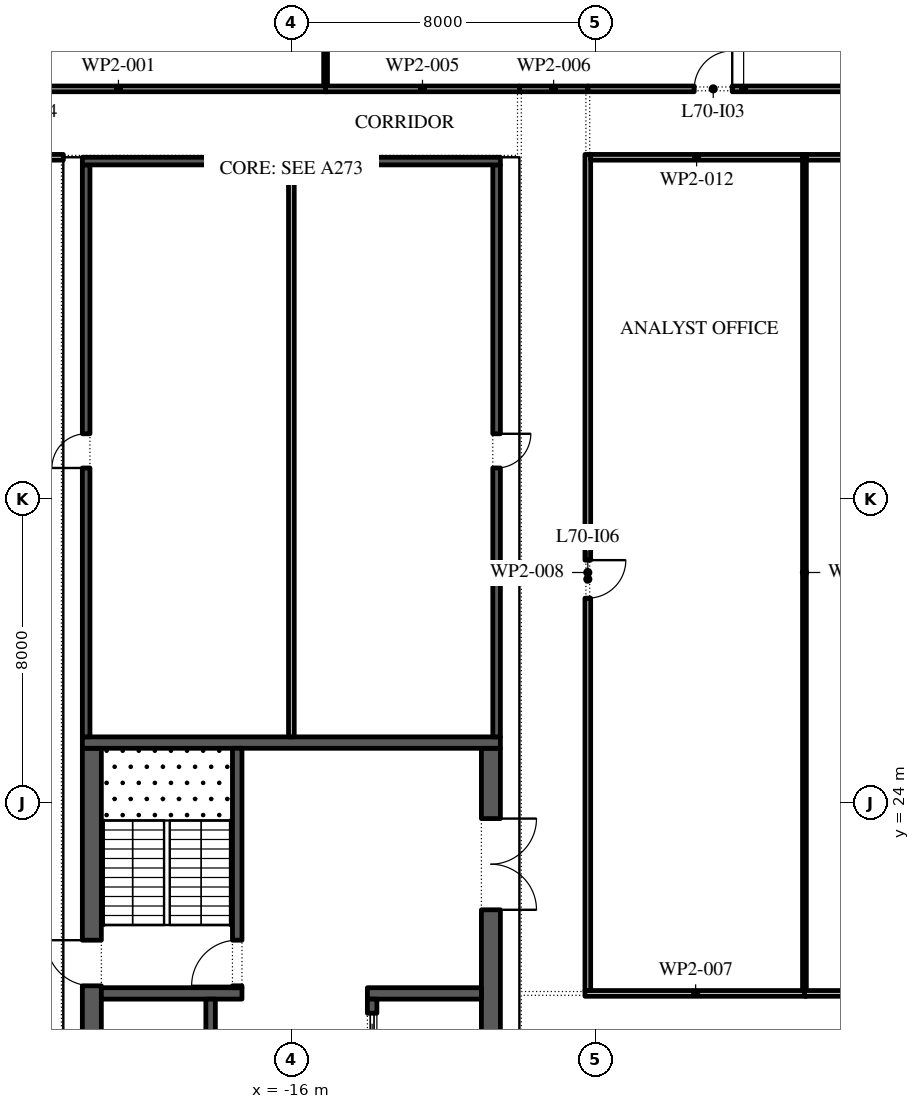
"""IFC4 building model, lengths in metres.
Left out: names, types, materials, properties, quantities, classifications, styles, units other than length and angle.
Written with IfcOpenShell. Run it as: python <this file> out.ifc"""

import sys

from ifc_helpers import new_model, si_unit, direction, frame, frame_2d, origin, place, context, subcontext, project, spatial, rectangle, extrude, element, fill, save


model = new_model("IFC4")
c1 = context("Model", 3, precision=1e-05, world=origin(), true_north=direction((0.0, 1.0)))
c2 = subcontext(c1, "Body", "Model", "MODEL_VIEW")
j1 = project(units=[si_unit("LENGTHUNIT", "METRE"), si_unit("PLANEANGLEUNIT", "RADIAN")], contexts=[c1])
p1 = place(None, origin())
s1 = spatial("IfcSite", under=j1, at=p1, CompositionType="ELEMENT")
p2 = place(p1, origin())
s2 = spatial("IfcBuilding", under=s1, at=p2, CompositionType="ELEMENT")
p3 = place(p2, frame((0.0, 0.0, 321.6)))
s3 = spatial("IfcBuildingStorey", under=s2, at=p3, CompositionType="ELEMENT", Elevation=321.6)
p4 = place(p3, frame((-21.25, -2.45, 0.0), z_axis=(0.0, 0.0, 1.0), x_axis=(0.0, 1.0, 0.0)))
e1 = element("IfcWall", 1, at=p4, inside=s3, PredefinedType="SHEAR", context=c2, shape_type="SweptSolid", body=[
    extrude(rectangle(XDim=27.9, YDim=0.5, at=frame_2d((13.95, 0.0))), origin(), (0.0, 0.0, 1.0), 4.0),
])
p5 = place(p4, frame((5.05, 0.0, 0.0)))
e2 = element("IfcOpeningElement", 2, at=p5, cuts=e1, PredefinedType="OPENING", context=c2, shape_type="SweptSolid", body=[
    extrude(rectangle(XDim=1.2, YDim=2.1, at=frame_2d((0.6, 1.05))), frame((0.0, 0.26, 0.0), z_axis=(0.0, -1.0, 0.0), x_axis=(1.0, 0.0, 0.0)), (0.0, 0.0, 1.0), 0.52),
])
p6 = place(p4, frame((21.65, 0.0, 0.0)))
e3 = element("IfcOpeningElement", 3, at=p6, cuts=e1, PredefinedType="OPENING", context=c2, shape_type="SweptSolid", body=[
    extrude(rectangle(XDim=1.2, YDim=2.1, at=frame_2d((0.6, 1.05))), frame((0.0, 0.26, 0.0), z_axis=(0.0, -1.0, 0.0), x_axis=(1.0, 0.0, 0.0)), (0.0, 0.0, 1.0), 0.52),
])
p7 = place(p3, frame((-10.75, -2.45, 0.0), z_axis=(0.0, 0.0, 1.0), x_axis=(0.0, 1.0, 0.0)))
e4 = element("IfcWall", 4, at=p7, inside=s3, PredefinedType="SHEAR", context=c2, shape_type="SweptSolid", body=[
    extrude(rectangle(XDim=27.9, YDim=0.5, at=frame_2d((13.95, 0.0))), origin(), (0.0, 0.0, 1.0), 4.0),
])
p8 = place(p7, frame((23.65, 0.0, 0.0)))
e5 = element("IfcOpeningElement", 5, at=p8, cuts=e4, PredefinedType="OPENING", context=c2, shape_type="SweptSolid", body=[
    extrude(rectangle(XDim=2.4, YDim=2.1, at=frame_2d((1.2, 1.05))), frame((0.0, 0.26, 0.0), z_axis=(0.0, -1.0, 0.0), x_axis=(1.0, 0.0, 0.0)), (0.0, 0.0, 1.0), 0.52),
])
p9 = place(p7, frame((1.387, 0.0, 0.0)))
e6 = element("IfcOpeningElement", 6, at=p9, cuts=e4, PredefinedType="OPENING", context=c2, shape_type="SweptSolid", body=[
    extrude(rectangle(XDim=0.9, YDim=2.1, at=frame_2d((0.45, 1.05))), frame((0.0, 0.26, 0.0), z_axis=(0.0, -1.0, 0.0), x_axis=(1.0, 0.0, 0.0)), (0.0, 0.0, 1.0), 0.52),
])
p10 = place(p7, frame((4.562, 0.0, 0.0)))
e7 = element("IfcOpeningElement", 7, at=p10, cuts=e4, PredefinedType="OPENING", context=c2, shape_type="SweptSolid", body=[
    extrude(rectangle(XDim=1.0, YDim=2.1, at=frame_2d((0.5, 1.05))), frame((0.0, 0.26, 0.0), z_axis=(0.0, -1.0, 0.0), x_axis=(1.0, 0.0, 0.0)), (0.0, 0.0, 1.0), 0.52),
])
p11 = place(p3, frame((-21.5, 25.6, 0.0), z_axis=(0.0, 0.0, 1.0), x_axis=(1.0, 0.0, 0.0)))
e8 = element("IfcWall", 8, at=p11, inside=s3, PredefinedType="SHEAR", context=c2, shape_type="SweptSolid", body=[
    extrude(rectangle(XDim=11.0, YDim=0.3, at=frame_2d((5.5, 0.0))), origin(), (0.0, 0.0, 1.0), 4.0),
])
p12 = place(p3, frame((-21.0, 19.0, 0.0), z_axis=(0.0, 0.0, 1.0), x_axis=(1.0, 0.0, 0.0)))
e9 = element("IfcWall", 9, at=p12, inside=s3, PredefinedType="SHEAR", context=c2, shape_type="SweptSolid", body=[
    extrude(rectangle(XDim=3.7, YDim=0.3, at=frame_2d((1.85, 0.0))), origin(), (0.0, 0.0, 1.0), 4.0),
])
p13 = place(p3, frame((-17.425, 19.15, 0.0), z_axis=(0.0, 0.0, 1.0), x_axis=(0.0, 1.0, 0.0)))
e10 = element("IfcWall", 10, at=p13, inside=s3, PredefinedType="SHEAR", context=c2, shape_type="SweptSolid", body=[
    extrude(rectangle(XDim=6.3, YDim=0.25, at=frame_2d((3.15, 0.0))), origin(), (0.0, 0.0, 1.0), 4.0),
])
p14 = place(p13, frame((0.05, 0.0, 0.0)))
e11 = element("IfcOpeningElement", 11, at=p14, cuts=e10, PredefinedType="OPENING", context=c2, shape_type="SweptSolid", body=[
    extrude(rectangle(XDim=1.2, YDim=2.1, at=frame_2d((0.6, 1.05))), frame((0.0, 0.135, 0.0), z_axis=(0.0, -1.0, 0.0), x_axis=(1.0, 0.0, 0.0)), (0.0, 0.0, 1.0), 0.27),
])
p15 = place(p3, frame((-18.125, 4.15, 0.0), z_axis=(0.0, 0.0, 1.0), x_axis=(0.0, 1.0, 0.0)))
e12 = element("IfcWall", 12, at=p15, inside=s3, PredefinedType="SHEAR", context=c2, shape_type="SweptSolid", body=[
    extrude(rectangle(XDim=14.7, YDim=0.25, at=frame_2d((7.35, 0.0))), origin(), (0.0, 0.0, 1.0), 4.0),
])
p16 = place(p15, frame((3.796, 0.0, 0.0)))
e13 = element("IfcOpeningElement", 13, at=p16, cuts=e12, PredefinedType="OPENING", context=c2, shape_type="SweptSolid", body=[
    extrude(rectangle(XDim=0.9, YDim=2.1, at=frame_2d((0.45, 1.05))), frame((0.0, 0.135, 0.0), z_axis=(0.0, -1.0, 0.0), x_axis=(1.0, 0.0, 0.0)), (0.0, 0.0, 1.0), 0.27),
])
p17 = place(p15, frame((8.0, 0.0, 0.0)))
e14 = element("IfcOpeningElement", 14, at=p17, cuts=e12, PredefinedType="OPENING", context=c2, shape_type="SweptSolid", body=[
    extrude(rectangle(XDim=0.9, YDim=2.1, at=frame_2d((0.45, 1.05))), frame((0.0, 0.135, 0.0), z_axis=(0.0, -1.0, 0.0), x_axis=(1.0, 0.0, 0.0)), (0.0, 0.0, 1.0), 0.27),
])
p18 = place(p15, frame((12.175, 0.0, 0.0)))
e15 = element("IfcOpeningElement", 15, at=p18, cuts=e12, PredefinedType="OPENING", context=c2, shape_type="SweptSolid", body=[
    extrude(rectangle(XDim=0.9, YDim=2.1, at=frame_2d((0.45, 1.05))), frame((0.0, 0.135, 0.0), z_axis=(0.0, -1.0, 0.0), x_axis=(1.0, 0.0, 0.0)), (0.0, 0.0, 1.0), 0.27),
])
p19 = place(p15, frame((0.371, 0.0, 0.0)))
e16 = element("IfcOpeningElement", 16, at=p19, cuts=e12, PredefinedType="OPENING", context=c2, shape_type="SweptSolid", body=[
    extrude(rectangle(XDim=1.1, YDim=2.1, at=frame_2d((0.55, 1.05))), frame((0.0, 0.135, 0.0), z_axis=(0.0, -1.0, 0.0), x_axis=(1.0, 0.0, 0.0)), (0.0, 0.0, 1.0), 0.27),
])
p20 = place(p3, frame((-14.0, 19.0, 0.0), z_axis=(0.0, 0.0, 1.0), x_axis=(1.0, 0.0, 0.0)))
e17 = element("IfcWall", 17, at=p20, inside=s3, PredefinedType="SHEAR", context=c2, shape_type="SweptSolid", body=[
    extrude(rectangle(XDim=3.0, YDim=0.3, at=frame_2d((1.5, 0.0))), origin(), (0.0, 0.0, 1.0), 4.0),
])
p21 = place(p3, frame((-13.875, -2.45, 0.0), z_axis=(0.0, 0.0, 1.0), x_axis=(0.0, 1.0, 0.0)))
e18 = element("IfcWall", 18, at=p21, inside=s3, PredefinedType="SHEAR", context=c2, shape_type="SweptSolid", body=[
    extrude(rectangle(XDim=21.3, YDim=0.25, at=frame_2d((10.65, 0.0))), origin(), (0.0, 0.0, 1.0), 4.0),
])
p22 = place(p21, frame((9.846, 0.0, 0.0)))
e19 = element("IfcOpeningElement", 19, at=p22, cuts=e18, PredefinedType="OPENING", context=c2, shape_type="SweptSolid", body=[
    extrude(rectangle(XDim=0.9, YDim=2.1, at=frame_2d((0.45, 1.05))), frame((0.0, 0.135, 0.0), z_axis=(0.0, -1.0, 0.0), x_axis=(1.0, 0.0, 0.0)), (0.0, 0.0, 1.0), 0.27),
])
p23 = place(p21, frame((12.911, 0.0, 0.0)))
e20 = element("IfcOpeningElement", 20, at=p23, cuts=e18, PredefinedType="OPENING", context=c2, shape_type="SweptSolid", body=[
    extrude(rectangle(XDim=0.9, YDim=2.1, at=frame_2d((0.45, 1.05))), frame((0.0, 0.135, 0.0), z_axis=(0.0, -1.0, 0.0), x_axis=(1.0, 0.0, 0.0)), (0.0, 0.0, 1.0), 0.27),
])
p24 = place(p21, frame((6.971, 0.0, 0.0)))
e21 = element("IfcOpeningElement", 21, at=p24, cuts=e18, PredefinedType="OPENING", context=c2, shape_type="SweptSolid", body=[
    extrude(rectangle(XDim=1.1, YDim=2.1, at=frame_2d((0.55, 1.05))), frame((0.0, 0.135, 0.0), z_axis=(0.0, -1.0, 0.0), x_axis=(1.0, 0.0, 0.0)), (0.0, 0.0, 1.0), 0.27),
])
p25 = place(p21, frame((15.543, 0.0, 0.0)))
e22 = element("IfcOpeningElement", 22, at=p25, cuts=e18, PredefinedType="OPENING", context=c2, shape_type="SweptSolid", body=[
    extrude(rectangle(XDim=1.1, YDim=2.1, at=frame_2d((0.55, 1.05))), frame((0.0, 0.135, 0.0), z_axis=(0.0, -1.0, 0.0), x_axis=(1.0, 0.0, 0.0)), (0.0, 0.0, 1.0), 0.27),
])
p26 = place(p21, frame((17.686, 0.0, 0.0)))
e23 = element("IfcOpeningElement", 23, at=p26, cuts=e18, PredefinedType="OPENING", context=c2, shape_type="SweptSolid", body=[
    extrude(rectangle(XDim=1.1, YDim=2.1, at=frame_2d((0.55, 1.05))), frame((0.0, 0.135, 0.0), z_axis=(0.0, -1.0, 0.0), x_axis=(1.0, 0.0, 0.0)), (0.0, 0.0, 1.0), 0.27),
])
p27 = place(p21, frame((19.829, 0.0, 0.0)))
e24 = element("IfcOpeningElement", 24, at=p27, cuts=e18, PredefinedType="OPENING", context=c2, shape_type="SweptSolid", body=[
    extrude(rectangle(XDim=1.1, YDim=2.1, at=frame_2d((0.55, 1.05))), frame((0.0, 0.135, 0.0), z_axis=(0.0, -1.0, 0.0), x_axis=(1.0, 0.0, 0.0)), (0.0, 0.0, 1.0), 0.27),
])
p28 = place(p3, frame((-21.4, 25.75, 0.0), z_axis=(0.0, 0.0, 1.0), x_axis=(0.0, 1.0, 0.0)))
e25 = element("IfcWall", 25, at=p28, inside=s3, PredefinedType="SHEAR", context=c2, shape_type="SweptSolid", body=[
    extrude(rectangle(XDim=15.05, YDim=0.2, at=frame_2d((7.525, 0.0))), origin(), (0.0, 0.0, 1.0), 4.0),
])
p29 = place(p28, frame((7.075, 0.0, 0.0)))
e26 = element("IfcOpeningElement", 26, at=p29, cuts=e25, PredefinedType="OPENING", context=c2, shape_type="SweptSolid", body=[
    extrude(rectangle(XDim=0.9, YDim=2.1, at=frame_2d((0.45, 1.05))), frame((0.0, 0.11, 0.0), z_axis=(0.0, -1.0, 0.0), x_axis=(1.0, 0.0, 0.0)), (0.0, 0.0, 1.0), 0.22),
])
p30 = place(p3, frame((-10.6, 25.75, 0.0), z_axis=(0.0, 0.0, 1.0), x_axis=(0.0, 1.0, 0.0)))
e27 = element("IfcWall", 27, at=p30, inside=s3, PredefinedType="SHEAR", context=c2, shape_type="SweptSolid", body=[
    extrude(rectangle(XDim=15.05, YDim=0.2, at=frame_2d((7.525, 0.0))), origin(), (0.0, 0.0, 1.0), 4.0),
])
p31 = place(p30, frame((7.075, 0.0, 0.0)))
e28 = element("IfcOpeningElement", 28, at=p31, cuts=e27, PredefinedType="OPENING", context=c2, shape_type="SweptSolid", body=[
    extrude(rectangle(XDim=0.9, YDim=2.1, at=frame_2d((0.45, 1.05))), frame((0.0, 0.11, 0.0), z_axis=(0.0, -1.0, 0.0), x_axis=(1.0, 0.0, 0.0)), (0.0, 0.0, 1.0), 0.22),
])
p32 = place(p3, frame((-21.5, 40.9, 0.0), z_axis=(0.0, 0.0, 1.0), x_axis=(1.0, 0.0, 0.0)))
e29 = element("IfcWall", 29, at=p32, inside=s3, PredefinedType="SHEAR", context=c2, shape_type="SweptSolid", body=[
    extrude(rectangle(XDim=11.0, YDim=0.2, at=frame_2d((5.5, 0.0))), origin(), (0.0, 0.0, 1.0), 4.0),
])
p33 = place(p3, frame((-16.0, 25.75, 0.0), z_axis=(0.0, 0.0, 1.0), x_axis=(0.0, 1.0, 0.0)))
e30 = element("IfcWall", 30, at=p33, inside=s3, PredefinedType="PARTITIONING", context=c2, shape_type="SweptSolid", body=[
    extrude(rectangle(XDim=15.05, YDim=0.15, at=frame_2d((7.525, 0.0))), origin(), (0.0, 0.0, 1.0), 4.0),
])
p34 = place(p3, frame((-26.05, 42.8, 0.0), z_axis=(0.0, 0.0, 1.0), x_axis=(1.0, 0.0, 0.0)))
e31 = element("IfcWall", 31, at=p34, inside=s3, PredefinedType="PARTITIONING", context=c2, shape_type="SweptSolid", body=[
    extrude(rectangle(XDim=11.0, YDim=0.15, at=frame_2d((5.5, 0.0))), origin(), (0.0, 0.0, 1.0), 4.0),
])
p35 = place(p34, frame((2.55, 0.0, 0.0)))
e32 = element("IfcOpeningElement", 32, at=p35, cuts=e31, PredefinedType="OPENING", context=c2, shape_type="SweptSolid", body=[
    extrude(rectangle(XDim=1.0, YDim=2.1, at=frame_2d((0.5, 1.05))), frame((0.0, 0.085, 0.0), z_axis=(0.0, -1.0, 0.0), x_axis=(1.0, 0.0, 0.0)), (0.0, 0.0, 1.0), 0.17),
])
p36 = place(p3, frame((-22.0, 41.0, 0.0), z_axis=(0.0, 0.0, 1.0), x_axis=(-1.0, 0.0, 0.0)))
e33 = element("IfcWall", 33, at=p36, inside=s3, PredefinedType="PARTITIONING", context=c2, shape_type="SweptSolid", body=[
    extrude(rectangle(XDim=4.05, YDim=0.15, at=frame_2d((2.025, 0.0))), origin(), (0.0, 0.0, 1.0), 4.0),
])
p37 = place(p36, frame((2.1, 0.0, 0.0)))
e34 = element("IfcOpeningElement", 34, at=p37, cuts=e33, PredefinedType="OPENING", context=c2, shape_type="SweptSolid", body=[
    extrude(rectangle(XDim=1.0, YDim=2.1, at=frame_2d((0.5, 1.05))), frame((0.0, 0.085, 0.0), z_axis=(0.0, -1.0, 0.0), x_axis=(1.0, 0.0, 0.0)), (0.0, 0.0, 1.0), 0.17),
])
p38 = place(p3, frame((-15.1, 42.875, 0.0), z_axis=(0.0, 0.0, 1.0), x_axis=(0.0, 1.0, 0.0)))
e35 = element("IfcWall", 35, at=p38, inside=s3, PredefinedType="PARTITIONING", context=c2, shape_type="SweptSolid", body=[
    extrude(rectangle(XDim=9.925, YDim=0.1, at=frame_2d((4.962, 0.0))), origin(), (0.0, 0.0, 1.0), 4.0),
])
p39 = place(p3, frame((-15.1, 42.8, 0.0), z_axis=(0.0, 0.0, 1.0), x_axis=(1.0, 0.0, 0.0)))
e36 = element("IfcWall", 36, at=p39, inside=s3, PredefinedType="PARTITIONING", context=c2, shape_type="SweptSolid", body=[
    extrude(rectangle(XDim=5.1, YDim=0.15, at=frame_2d((2.55, 0.0))), origin(), (0.0, 0.0, 1.0), 4.0),
])
p40 = place(p3, frame((-10.0, 42.8, 0.0), z_axis=(0.0, 0.0, 1.0), x_axis=(1.0, 0.0, 0.0)))
e37 = element("IfcWall", 37, at=p40, inside=s3, PredefinedType="PARTITIONING", context=c2, shape_type="SweptSolid", body=[
    extrude(rectangle(XDim=1.8, YDim=0.15, at=frame_2d((0.9, 0.0))), origin(), (0.0, 0.0, 1.0), 4.0),
])
p41 = place(p3, frame((-8.275, 19.0, 0.0), z_axis=(0.0, 0.0, 1.0), x_axis=(1.0, 0.0, 0.0)))
e38 = element("IfcWall", 38, at=p41, inside=s3, PredefinedType="PARTITIONING", context=c2, shape_type="SweptSolid", body=[
    extrude(rectangle(XDim=5.825, YDim=0.15, at=frame_2d((2.913, 0.0))), origin(), (0.0, 0.0, 1.0), 4.0),
])
p42 = place(p3, frame((-8.2, 41.075, 0.0), z_axis=(0.0, 0.0, 1.0), x_axis=(0.0, -1.0, 0.0)))
e39 = element("IfcWall", 39, at=p42, inside=s3, PredefinedType="PARTITIONING", context=c2, shape_type="SweptSolid", body=[
    extrude(rectangle(XDim=22.0, YDim=0.15, at=frame_2d((11.0, 0.0))), origin(), (0.0, 0.0, 1.0), 4.0),
])
p43 = place(p42, frame((10.675, 0.0, 0.0)))
e40 = element("IfcOpeningElement", 40, at=p43, cuts=e39, PredefinedType="OPENING", context=c2, shape_type="SweptSolid", body=[
    extrude(rectangle(XDim=1.0, YDim=2.1, at=frame_2d((0.5, 1.05))), frame((0.0, 0.085, 0.0), z_axis=(0.0, -1.0, 0.0), x_axis=(1.0, 0.0, 0.0)), (0.0, 0.0, 1.0), 0.17),
])
p44 = place(p3, frame((-8.2, 42.8, 0.0), z_axis=(0.0, 0.0, 1.0), x_axis=(1.0, 0.0, 0.0)))
e41 = element("IfcWall", 41, at=p44, inside=s3, PredefinedType="PARTITIONING", context=c2, shape_type="SweptSolid", body=[
    extrude(rectangle(XDim=8.2, YDim=0.15, at=frame_2d((4.1, 0.0))), origin(), (0.0, 0.0, 1.0), 4.0),
])
p45 = place(p44, frame((2.8, 0.0, 0.0)))
e42 = element("IfcOpeningElement", 42, at=p45, cuts=e41, PredefinedType="OPENING", context=c2, shape_type="SweptSolid", body=[
    extrude(rectangle(XDim=1.0, YDim=2.1, at=frame_2d((0.5, 1.05))), frame((0.0, 0.085, 0.0), z_axis=(0.0, -1.0, 0.0), x_axis=(1.0, 0.0, 0.0)), (0.0, 0.0, 1.0), 0.17),
])
p46 = place(p3, frame((-2.5, 19.075, 0.0), z_axis=(0.0, 0.0, 1.0), x_axis=(0.0, 1.0, 0.0)))
e43 = element("IfcWall", 43, at=p46, inside=s3, PredefinedType="PARTITIONING", context=c2, shape_type="SweptSolid", body=[
    extrude(rectangle(XDim=22.0, YDim=0.1, at=frame_2d((11.0, 0.0))), origin(), (0.0, 0.0, 1.0), 4.0),
])
p47 = place(p3, frame((-2.5, 19.0, 0.0), z_axis=(0.0, 0.0, 1.0), x_axis=(1.0, 0.0, 0.0)))
e44 = element("IfcWall", 44, at=p47, inside=s3, PredefinedType="PARTITIONING", context=c2, shape_type="SweptSolid", body=[
    extrude(rectangle(XDim=10.775, YDim=0.15, at=frame_2d((5.387, 0.0))), origin(), (0.0, 0.0, 1.0), 4.0),
])
p48 = place(p3, frame((-2.55, 41.0, 0.0), z_axis=(0.0, 0.0, 1.0), x_axis=(-1.0, 0.0, 0.0)))
e45 = element("IfcWall", 45, at=p48, inside=s3, PredefinedType="PARTITIONING", context=c2, shape_type="SweptSolid", body=[
    extrude(rectangle(XDim=5.575, YDim=0.15, at=frame_2d((2.788, 0.0))), origin(), (0.0, 0.0, 1.0), 4.0),
])
p49 = place(p3, frame((8.125, 41.0, 0.0), z_axis=(0.0, 0.0, 1.0), x_axis=(-1.0, 0.0, 0.0)))
e46 = element("IfcWall", 46, at=p49, inside=s3, PredefinedType="PARTITIONING", context=c2, shape_type="SweptSolid", body=[
    extrude(rectangle(XDim=10.575, YDim=0.15, at=frame_2d((5.288, 0.0))), origin(), (0.0, 0.0, 1.0), 4.0),
])
p50 = place(p27, origin())
e47 = element("IfcDoor", 47, at=p50, inside=s3, OperationType="SLIDING_TO_LEFT", PredefinedType="DOOR", context=c2, shape_type="SweptSolid", body=[
    extrude(rectangle(XDim=1.1, YDim=2.1, at=frame_2d((0.55, 1.05))), frame((0.0, 0.025, 0.0), z_axis=(0.0, -1.0, 0.0), x_axis=(1.0, 0.0, 0.0)), (0.0, 0.0, 1.0), 0.05),
])
fill(e24, e47)
p51 = place(p8, frame((2.4, 0.0, 0.0), z_axis=(0.0, 0.0, 1.0), x_axis=(-1.0, 0.0, 0.0)))
e48 = element("IfcDoor", 48, at=p51, inside=s3, OperationType="DOUBLE_DOOR_SINGLE_SWING", PredefinedType="DOOR", context=c2, shape_type="SweptSolid", body=[
    extrude(rectangle(XDim=2.4, YDim=2.1, at=frame_2d((1.2, 1.05))), frame((0.0, 0.025, 0.0), z_axis=(0.0, -1.0, 0.0), x_axis=(1.0, 0.0, 0.0)), (0.0, 0.0, 1.0), 0.05),
])
fill(e5, e48)
p52 = place(p14, origin())
e49 = element("IfcDoor", 49, at=p52, inside=s3, OperationType="SINGLE_SWING_RIGHT", PredefinedType="DOOR", context=c2, shape_type="SweptSolid", body=[
    extrude(rectangle(XDim=1.2, YDim=2.1, at=frame_2d((0.6, 1.05))), frame((0.0, 0.025, 0.0), z_axis=(0.0, -1.0, 0.0), x_axis=(1.0, 0.0, 0.0)), (0.0, 0.0, 1.0), 0.05),
])
fill(e11, e49)
p53 = place(p6, origin())
e50 = element("IfcDoor", 50, at=p53, inside=s3, OperationType="SINGLE_SWING_LEFT", PredefinedType="DOOR", context=c2, shape_type="SweptSolid", body=[
    extrude(rectangle(XDim=1.2, YDim=2.1, at=frame_2d((0.6, 1.05))), frame((0.0, 0.025, 0.0), z_axis=(0.0, -1.0, 0.0), x_axis=(1.0, 0.0, 0.0)), (0.0, 0.0, 1.0), 0.05),
])
fill(e3, e50)
p54 = place(p29, origin())
e51 = element("IfcDoor", 51, at=p54, inside=s3, OperationType="SINGLE_SWING_RIGHT", PredefinedType="DOOR", context=c2, shape_type="SweptSolid", body=[
    extrude(rectangle(XDim=0.9, YDim=2.1, at=frame_2d((0.45, 1.05))), frame((0.0, -0.05, 0.0), z_axis=(0.0, -1.0, 0.0), x_axis=(1.0, 0.0, 0.0)), (0.0, 0.0, 1.0), 0.05),
])
fill(e26, e51)
p55 = place(p31, frame((0.9, 0.15, 0.0), z_axis=(0.0, 0.0, 1.0), x_axis=(-1.0, 0.0, 0.0)))
e52 = element("IfcDoor", 52, at=p55, inside=s3, OperationType="SINGLE_SWING_RIGHT", PredefinedType="DOOR", context=c2, shape_type="SweptSolid", body=[
    extrude(rectangle(XDim=0.9, YDim=2.1, at=frame_2d((0.45, 1.05))), frame((0.0, 0.1, 0.0), z_axis=(0.0, -1.0, 0.0), x_axis=(1.0, 0.0, 0.0)), (0.0, 0.0, 1.0), 0.05),
])
fill(e28, e52)
p56 = place(p45, origin())
e53 = element("IfcDoor", 53, at=p56, inside=s3, OperationType="SINGLE_SWING_LEFT", PredefinedType="DOOR", context=c2, shape_type="SweptSolid", body=[
    extrude(rectangle(XDim=1.0, YDim=2.1, at=frame_2d((0.5, 1.05))), frame((0.0, 0.025, 0.0), z_axis=(0.0, -1.0, 0.0), x_axis=(1.0, 0.0, 0.0)), (0.0, 0.0, 1.0), 0.05),
])
fill(e42, e53)
p57 = place(p43, origin())
e54 = element("IfcDoor", 54, at=p57, inside=s3, OperationType="SINGLE_SWING_RIGHT", PredefinedType="DOOR", context=c2, shape_type="SweptSolid", body=[
    extrude(rectangle(XDim=1.0, YDim=2.1, at=frame_2d((0.5, 1.05))), frame((0.0, 0.025, 0.0), z_axis=(0.0, -1.0, 0.0), x_axis=(1.0, 0.0, 0.0)), (0.0, 0.0, 1.0), 0.05),
])
fill(e40, e54)
save(model, sys.argv[1])
